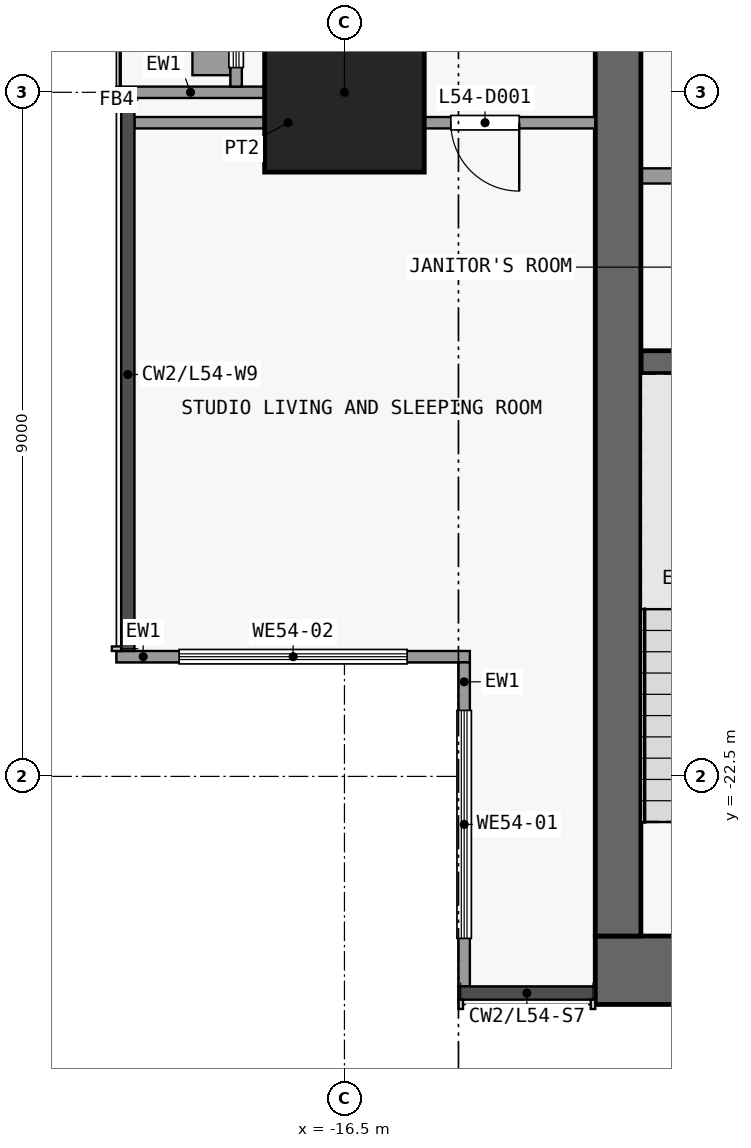
"""IFC4 building model, lengths in metres.
Left out: names, types, materials, properties, quantities, classifications, styles, units other than length and angle.
Written with IfcOpenShell. Run it as: python <this file> out.ifc"""

import sys

from ifc_helpers import new_model, si_unit, direction, frame, frame_2d, origin, origin_2d, place, context, subcontext, project, spatial, rectangle, extrude, element, fill, save


model = new_model("IFC4")
c1 = context("Model", 3, precision=1e-05, world=origin(), true_north=direction((0.0, 1.0)))
c2 = subcontext(c1, "Body", "Model", "MODEL_VIEW")
j1 = project(units=[si_unit("LENGTHUNIT", "METRE"), si_unit("PLANEANGLEUNIT", "RADIAN")], contexts=[c1])
p1 = place(None, origin())
s1 = spatial("IfcSite", under=j1, at=p1, CompositionType="ELEMENT")
p2 = place(p1, origin())
s2 = spatial("IfcBuilding", under=s1, at=p2, CompositionType="ELEMENT")
p3 = place(p2, frame((0.0, 0.0, 215.9)))
s3 = spatial("IfcBuildingStorey", under=s2, at=p3, CompositionType="ELEMENT", Elevation=215.9)
p4 = place(p3, frame((-16.5, -13.5, 0.0), z_axis=(0.0, 0.0, 1.0), x_axis=(1.0, 0.0, 0.0)))
e1 = element("IfcColumn", 1, at=p4, inside=s3, PredefinedType="COLUMN", context=c2, shape_type="SweptSolid", body=[
    extrude(rectangle(XDim=2.1, YDim=2.1, at=origin_2d()), origin(), (0.0, 0.0, 1.0), 3.6),
])
p5 = place(p3, frame((-13.2, -25.05, 0.0), z_axis=(0.0, 0.0, 1.0), x_axis=(1.0, 0.0, 0.0)))
e2 = element("IfcWall", 2, at=p5, inside=s3, PredefinedType="SHEAR", context=c2, shape_type="SweptSolid", body=[
    extrude(rectangle(XDim=26.4, YDim=0.9, at=frame_2d((13.2, 0.0))), origin(), (0.0, 0.0, 1.0), 3.3),
])
p6 = place(p3, frame((-12.9, -24.6, 0.0), z_axis=(0.0, 0.0, 1.0), x_axis=(0.0, 1.0, 0.0)))
e3 = element("IfcWall", 3, at=p6, inside=s3, PredefinedType="SHEAR", context=c2, shape_type="SweptSolid", body=[
    extrude(rectangle(XDim=16.1, YDim=0.6, at=frame_2d((8.05, 0.0))), origin(), (0.0, 0.0, 1.0), 3.3),
])
p7 = place(p3, frame((-12.6, -17.05, 0.0), z_axis=(0.0, 0.0, 1.0), x_axis=(1.0, 0.0, 0.0)))
e4 = element("IfcWall", 4, at=p7, inside=s3, PredefinedType="SHEAR", context=c2, shape_type="SweptSolid", body=[
    extrude(rectangle(XDim=3.1, YDim=0.3, at=frame_2d((1.55, 0.0))), origin(), (0.0, 0.0, 1.0), 3.3),
])
p8 = place(p3, frame((-12.6, -14.6, 0.0), z_axis=(0.0, 0.0, 1.0), x_axis=(1.0, 0.0, 0.0)))
e5 = element("IfcWall", 5, at=p8, inside=s3, PredefinedType="PARTITIONING", context=c2, shape_type="SweptSolid", body=[
    extrude(rectangle(XDim=1.45, YDim=0.2, at=frame_2d((0.725, 0.0))), origin(), (0.0, 0.0, 1.0), 3.3),
])
p9 = place(p3, frame((-14.925, -25.262, 0.0), z_axis=(0.0, 0.0, 1.0), x_axis=(0.0, 1.0, 0.0)))
e6 = element("IfcWall", 6, at=p9, inside=s3, PredefinedType="SOLIDWALL", context=c2, shape_type="SweptSolid", body=[
    extrude(rectangle(XDim=4.262, YDim=0.15, at=frame_2d((2.131, 0.0))), origin(), (0.0, 0.0, 1.0), 3.3),
])
p10 = place(p9, frame((0.631, 0.0, 0.9)))
e7 = element("IfcOpeningElement", 7, at=p10, cuts=e6, PredefinedType="OPENING", context=c2, shape_type="SweptSolid", body=[
    extrude(rectangle(XDim=3.0, YDim=2.4, at=frame_2d((1.5, 1.2))), frame((0.0, 0.085, 0.0), z_axis=(0.0, -1.0, 0.0), x_axis=(1.0, 0.0, 0.0)), (0.0, 0.0, 1.0), 0.17),
])
p11 = place(p3, frame((-14.85, -20.925, 0.0), z_axis=(0.0, 0.0, 1.0), x_axis=(-1.0, 0.0, 0.0)))
e8 = element("IfcWall", 8, at=p11, inside=s3, PredefinedType="SOLIDWALL", context=c2, shape_type="SweptSolid", body=[
    extrude(rectangle(XDim=4.65, YDim=0.15, at=frame_2d((2.325, 0.0))), origin(), (0.0, 0.0, 1.0), 3.3),
])
p12 = place(p11, frame((0.825, 0.0, 0.9)))
e9 = element("IfcOpeningElement", 9, at=p12, cuts=e8, PredefinedType="OPENING", context=c2, shape_type="SweptSolid", body=[
    extrude(rectangle(XDim=3.0, YDim=2.4, at=frame_2d((1.5, 1.2))), frame((0.0, 0.085, 0.0), z_axis=(0.0, -1.0, 0.0), x_axis=(1.0, 0.0, 0.0)), (0.0, 0.0, 1.0), 0.17),
])
p13 = place(p3, frame((-17.55, -13.5, 0.0), z_axis=(0.0, 0.0, 1.0), x_axis=(-1.0, 0.0, 0.0)))
e10 = element("IfcWall", 10, at=p13, inside=s3, PredefinedType="SOLIDWALL", context=c2, shape_type="SweptSolid", body=[
    extrude(rectangle(XDim=1.95, YDim=0.15, at=frame_2d((0.975, 0.0))), origin(), (0.0, 0.0, 1.0), 3.3),
])
p14 = place(p3, frame((-17.925, -13.425, 0.0), z_axis=(0.0, 0.0, 1.0), x_axis=(0.0, 1.0, 0.0)))
e11 = element("IfcWall", 11, at=p14, inside=s3, PredefinedType="SOLIDWALL", context=c2, shape_type="SweptSolid", body=[
    extrude(rectangle(XDim=8.85, YDim=0.15, at=frame_2d((4.425, 0.0))), origin(), (0.0, 0.0, 1.0), 3.3),
])
p15 = place(p14, frame((3.05, 0.0, 0.0)))
e12 = element("IfcOpeningElement", 12, at=p15, cuts=e11, PredefinedType="OPENING", context=c2, shape_type="SweptSolid", body=[
    extrude(rectangle(XDim=1.2, YDim=2.4, at=frame_2d((0.6, 1.2))), frame((0.0, 0.085, 0.0), z_axis=(0.0, -1.0, 0.0), x_axis=(1.0, 0.0, 0.0)), (0.0, 0.0, 1.0), 0.17),
])
p16 = place(p14, frame((0.25, 0.0, 0.9)))
e13 = element("IfcOpeningElement", 13, at=p16, cuts=e11, PredefinedType="OPENING", context=c2, shape_type="SweptSolid", body=[
    extrude(rectangle(XDim=2.05, YDim=2.1, at=frame_2d((1.025, 1.05))), frame((0.0, 0.085, 0.0), z_axis=(0.0, -1.0, 0.0), x_axis=(1.0, 0.0, 0.0)), (0.0, 0.0, 1.0), 0.17),
])
p17 = place(p14, frame((5.775, 0.0, 0.9)))
e14 = element("IfcOpeningElement", 14, at=p17, cuts=e11, PredefinedType="OPENING", context=c2, shape_type="SweptSolid", body=[
    extrude(rectangle(XDim=2.275, YDim=2.1, at=frame_2d((1.137, 1.05))), frame((0.0, 0.085, 0.0), z_axis=(0.0, -1.0, 0.0), x_axis=(1.0, 0.0, 0.0)), (0.0, 0.0, 1.0), 0.17),
])
p18 = place(p3, frame((-18.25, -13.275, 0.0), z_axis=(0.0, 0.0, 1.0), x_axis=(0.0, 1.0, 0.0)))
e15 = element("IfcWall", 15, at=p18, inside=s3, PredefinedType="USERDEFINED", context=c2, shape_type="SweptSolid", body=[
    extrude(rectangle(XDim=1.2, YDim=0.5, at=frame_2d((0.6, 0.0))), origin(), (0.0, 0.0, 1.0), 0.9),
])
p19 = place(p3, frame((-19.262, -13.9, 0.0), z_axis=(0.0, 0.0, 1.0), x_axis=(1.0, 0.0, 0.0)))
e16 = element("IfcWall", 16, at=p19, inside=s3, PredefinedType="PARTITIONING", context=c2, shape_type="SweptSolid", body=[
    extrude(rectangle(XDim=6.062, YDim=0.15, at=frame_2d((3.031, 0.0))), origin(), (0.0, 0.0, 1.0), 3.3),
])
p20 = place(p19, frame((4.162, 0.0, 0.0)))
e17 = element("IfcOpeningElement", 17, at=p20, cuts=e16, PredefinedType="OPENING", context=c2, shape_type="SweptSolid", body=[
    extrude(rectangle(XDim=0.9, YDim=2.1, at=frame_2d((0.45, 1.05))), frame((0.0, 0.085, 0.0), z_axis=(0.0, -1.0, 0.0), x_axis=(1.0, 0.0, 0.0)), (0.0, 0.0, 1.0), 0.17),
])
p21 = place(p3, frame((-16.2, -13.825, 0.0), z_axis=(0.0, 0.0, 1.0), x_axis=(0.0, 1.0, 0.0)))
e18 = element("IfcWall", 18, at=p21, inside=s3, PredefinedType="PARTITIONING", context=c2, shape_type="SweptSolid", body=[
    extrude(rectangle(XDim=2.85, YDim=0.15, at=frame_2d((1.425, 0.0))), origin(), (0.0, 0.0, 1.0), 3.3),
])
p22 = place(p10, origin())
e19 = element("IfcWindow", 19, at=p22, inside=s3, PartitioningType="SINGLE_PANEL", PredefinedType="WINDOW", context=c2, shape_type="SweptSolid", body=[
    extrude(rectangle(XDim=3.0, YDim=2.4, at=frame_2d((1.5, 1.2))), frame((0.0, 0.03, 0.0), z_axis=(0.0, -1.0, 0.0), x_axis=(1.0, 0.0, 0.0)), (0.0, 0.0, 1.0), 0.06),
])
fill(e7, e19)
p23 = place(p12, origin())
e20 = element("IfcWindow", 20, at=p23, inside=s3, PartitioningType="SINGLE_PANEL", PredefinedType="WINDOW", context=c2, shape_type="SweptSolid", body=[
    extrude(rectangle(XDim=3.0, YDim=2.4, at=frame_2d((1.5, 1.2))), frame((0.0, 0.03, 0.0), z_axis=(0.0, -1.0, 0.0), x_axis=(1.0, 0.0, 0.0)), (0.0, 0.0, 1.0), 0.06),
])
fill(e9, e20)
p24 = place(p16, origin())
e21 = element("IfcWindow", 21, at=p24, inside=s3, PartitioningType="SINGLE_PANEL", PredefinedType="WINDOW", context=c2, shape_type="SweptSolid", body=[
    extrude(rectangle(XDim=2.05, YDim=2.1, at=frame_2d((1.025, 1.05))), frame((0.0, 0.03, 0.0), z_axis=(0.0, -1.0, 0.0), x_axis=(1.0, 0.0, 0.0)), (0.0, 0.0, 1.0), 0.06),
])
fill(e13, e21)
p25 = place(p20, origin())
e22 = element("IfcDoor", 22, at=p25, inside=s3, OperationType="SINGLE_SWING_RIGHT", PredefinedType="DOOR", context=c2, shape_type="SweptSolid", body=[
    extrude(rectangle(XDim=0.9, YDim=2.1, at=frame_2d((0.45, 1.05))), frame((0.0, 0.025, 0.0), z_axis=(0.0, -1.0, 0.0), x_axis=(1.0, 0.0, 0.0)), (0.0, 0.0, 1.0), 0.05),
])
fill(e17, e22)
save(model, sys.argv[1])
